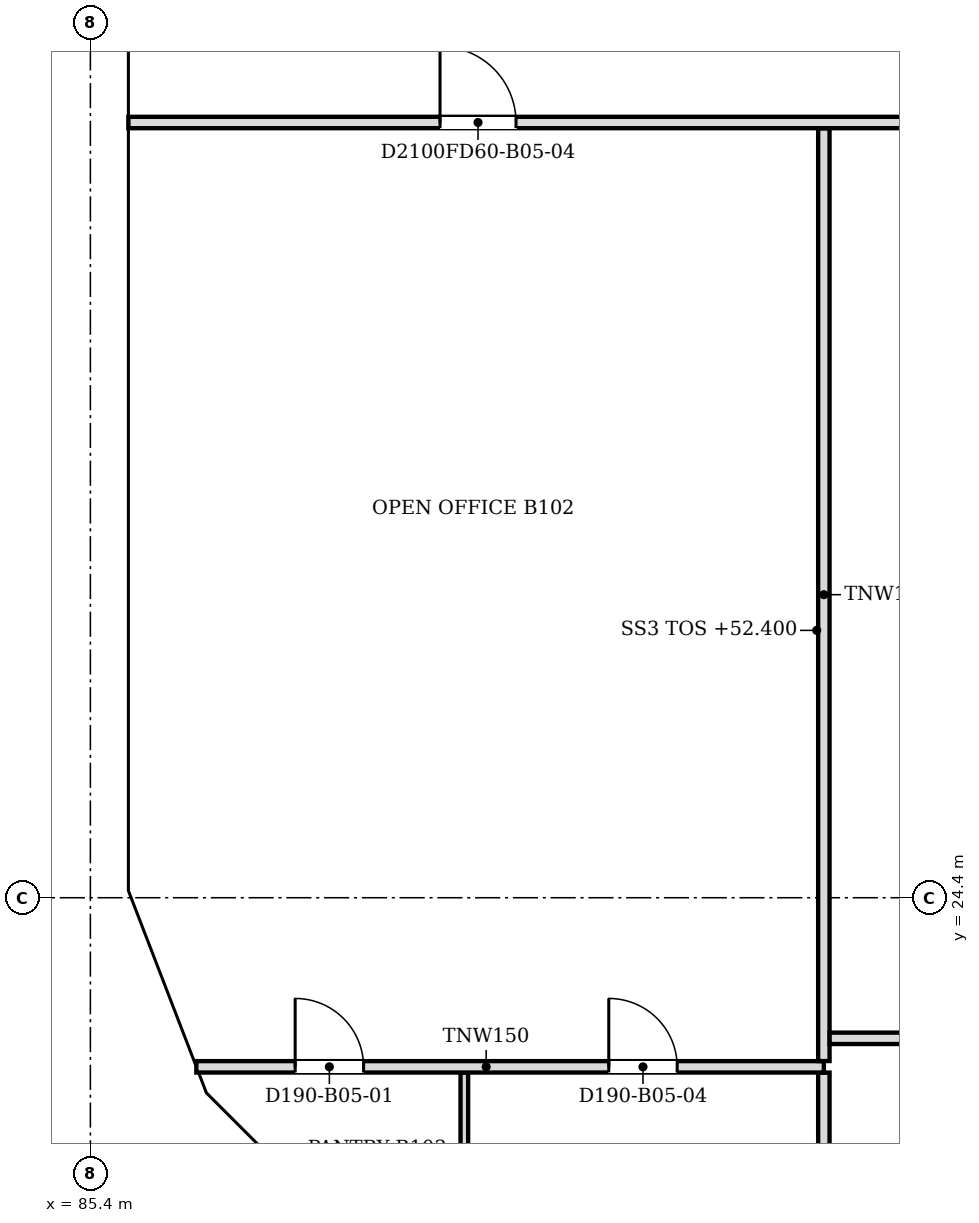
"""IFC4 building model, lengths in metres.
Left out: names, types, materials, properties, quantities, classifications, styles, units other than length and angle.
Written with IfcOpenShell. Run it as: python <this file> out.ifc"""

import sys

from ifc_helpers import new_model, si_unit, direction, frame, frame_2d, origin, place, context, subcontext, project, spatial, polyline, rectangle, outline, extrude, faceted_brep, source, transform, mapped, element, fill, save


model = new_model("IFC4")
c1 = context("Model", 3, precision=1e-05, world=origin(), true_north=direction((0.0, 1.0)))
c2 = subcontext(c1, "Body", "Model", "MODEL_VIEW")
j1 = project(units=[si_unit("LENGTHUNIT", "METRE"), si_unit("PLANEANGLEUNIT", "RADIAN")], contexts=[c1])
p1 = place(None, origin())
s1 = spatial("IfcSite", under=j1, at=p1, CompositionType="ELEMENT")
p2 = place(p1, origin())
s2 = spatial("IfcBuilding", under=s1, at=p2, CompositionType="ELEMENT")
p3 = place(p2, frame((0.0, 0.0, 52.4)))
s3 = spatial("IfcBuildingStorey", under=s2, at=p3, CompositionType="ELEMENT", Elevation=52.4)
m1 = source(origin(), c2, "Body", "Brep", [
    faceted_brep([(3.05, -0.25, 0.0), (6.1, -0.25, 3.8), (6.1, -0.25, 3.8), (3.05, -0.25, 7.6), (0.0, -0.25, 3.8), (0.0, 0.25, 3.8), (3.05, 0.25, 7.6), (6.1, 0.25, 3.8), (6.1, 0.25, 3.8), (3.05, 0.25, 0.0)], [[[0, 1, 2, 3, 4]], [[5, 6, 7, 8, 9]], [[9, 8, 1, 0]], [[7, 6, 3, 2]], [[6, 5, 4, 3]], [[5, 9, 0, 4]], [[1, 8, 7, 2]]]),
])
p4 = place(p3, frame((85.65, 39.65, -3.8), z_axis=(0.0, 0.0, 1.0), x_axis=(0.0, -1.0, 0.0)))
e1 = element("IfcWall", 1, at=p4, inside=s3, PredefinedType="SOLIDWALL", context=c2, shape_type="MappedRepresentation", body=[
    mapped(m1, transform((0.0, 0.0, 0.0), scale=1.0)),
])
m2 = source(origin(), c2, "Body", "SweptSolid", [
    extrude(outline(polyline([(3.05, 0.399), (5.78, 3.8), (3.05, 7.2), (0.321, 3.8), (3.05, 0.399)])), frame((0.0, 0.26, 0.0), z_axis=(0.0, -1.0, 0.0), x_axis=(1.0, 0.0, 0.0)), (0.0, 0.0, 1.0), 0.52),
])
p5 = place(p4, origin())
e2 = element("IfcOpeningElement", 2, at=p5, cuts=e1, PredefinedType="OPENING", context=c2, shape_type="MappedRepresentation", body=[
    mapped(m2, transform((0.0, 0.0, 0.0), scale=1.0)),
])
m3 = source(origin(), c2, "Body", "SweptSolid", [
    extrude(outline(polyline([(3.05, 0.0), (6.1, 3.8), (3.05, 7.6), (0.0, 3.8), (3.05, 0.0)])), frame((0.0, 0.25, 0.0), z_axis=(0.0, -1.0, 0.0), x_axis=(1.0, 0.0, 0.0)), (0.0, 0.0, 1.0), 0.5),
])
p6 = place(p3, frame((85.65, 33.55, -3.8), z_axis=(0.0, 0.0, 1.0), x_axis=(0.0, -1.0, 0.0)))
e3 = element("IfcWall", 3, at=p6, inside=s3, PredefinedType="SOLIDWALL", context=c2, shape_type="MappedRepresentation", body=[
    mapped(m3, transform((0.0, 0.0, 0.0), scale=1.0)),
])
p7 = place(p6, origin())
e4 = element("IfcOpeningElement", 4, at=p7, cuts=e3, PredefinedType="OPENING", context=c2, shape_type="MappedRepresentation", body=[
    mapped(m2, transform((0.0, 0.0, 0.0), scale=1.0)),
])
m4 = source(origin(), c2, "Body", "Brep", [
    faceted_brep([(3.003, -0.25, 0.0), (3.05, -0.25, 0.06), (3.05, -0.25, 7.54), (3.003, -0.25, 7.6), (0.0, -0.25, 3.8), (0.0, 0.25, 3.8), (2.957, 0.25, 7.541), (2.957, 0.25, 0.059), (3.003, 0.0, 0.0), (3.003, 0.0, 7.6)], [[[0, 1, 2, 3, 4]], [[5, 6, 7]], [[1, 0, 8]], [[9, 3, 2]], [[6, 5, 4, 3, 9]], [[5, 7, 8, 0, 4]], [[1, 8, 7, 6, 9, 2]]]),
])
p8 = place(p3, frame((85.65, 27.45, -3.8), z_axis=(0.0, 0.0, 1.0), x_axis=(0.0, -1.0, 0.0)))
e5 = element("IfcWall", 5, at=p8, inside=s3, PredefinedType="SOLIDWALL", context=c2, shape_type="MappedRepresentation", body=[
    mapped(m4, transform((0.0, 0.0, 0.0), scale=1.0)),
])
m5 = source(origin(), c2, "Body", "SweptSolid", [
    extrude(outline(polyline([(2.803, 6.944), (0.319, 3.8), (2.803, 0.656), (2.803, 6.944)])), frame((0.0, 0.26, 0.0), z_axis=(0.0, -1.0, 0.0), x_axis=(1.0, 0.0, 0.0)), (0.0, 0.0, 1.0), 0.52),
])
p9 = place(p8, origin())
e6 = element("IfcOpeningElement", 6, at=p9, cuts=e5, PredefinedType="OPENING", context=c2, shape_type="MappedRepresentation", body=[
    mapped(m5, transform((0.0, 0.0, 0.0), scale=1.0)),
])
m6 = source(origin(), c2, "Body", "Brep", [
    faceted_brep([(0.047, -0.25, 0.0), (2.997, -0.25, 3.8), (0.047, -0.25, 7.6), (0.0, -0.25, 7.541), (0.0, -0.25, 0.059), (0.093, 0.25, 7.54), (2.944, 0.25, 3.868), (2.944, 0.25, 3.732), (0.093, 0.25, 0.06), (2.997, 0.0, 3.8), (0.047, 0.0, 0.0), (0.047, 0.0, 7.6)], [[[0, 1, 2, 3, 4]], [[5, 6, 7, 8]], [[8, 7, 9, 1, 0, 10]], [[6, 5, 11, 2, 1, 9]], [[3, 2, 11]], [[10, 0, 4]], [[8, 10, 4, 3, 11, 5]], [[9, 7, 6]]]),
])
p10 = place(p3, frame((85.633, 24.49, -3.8), z_axis=(0.0, 0.0, 1.0), x_axis=(0.359901446078, -0.932990326376, 0.0)))
e7 = element("IfcWall", 7, at=p10, inside=s3, PredefinedType="SOLIDWALL", context=c2, shape_type="MappedRepresentation", body=[
    mapped(m6, transform((0.0, 0.0, 0.0), scale=1.0)),
])
m7 = source(origin(), c2, "Body", "SweptSolid", [
    extrude(outline(polyline([(0.247, 0.665), (2.681, 3.8), (0.247, 6.935), (0.247, 0.665)])), frame((0.0, 0.26, 0.0), z_axis=(0.0, -1.0, 0.0), x_axis=(1.0, 0.0, 0.0)), (0.0, 0.0, 1.0), 0.52),
])
p11 = place(p10, origin())
e8 = element("IfcOpeningElement", 8, at=p11, cuts=e7, PredefinedType="OPENING", context=c2, shape_type="MappedRepresentation", body=[
    mapped(m7, transform((0.0, 0.0, 0.0), scale=1.0)),
])
m8 = source(origin(), c2, "Body", "Brep", [
    faceted_brep([(2.944, -0.25, 0.0), (2.997, -0.25, 0.068), (2.997, -0.25, 7.532), (2.944, -0.25, 7.6), (0.0, -0.25, 3.8), (0.053, 0.25, 3.868), (2.891, 0.25, 7.532), (2.891, 0.25, 0.068), (0.053, 0.25, 3.731), (2.944, 0.0, 0.0), (2.944, 0.0, 7.6), (0.0, 0.0, 3.8)], [[[0, 1, 2, 3, 4]], [[5, 6, 7, 8]], [[1, 0, 9]], [[10, 3, 2]], [[6, 5, 11, 4, 3, 10]], [[8, 7, 9, 0, 4, 11]], [[8, 11, 5]], [[1, 9, 7, 6, 10, 2]]]),
])
p12 = place(p3, frame((86.712, 21.694, -3.8), z_axis=(0.0, 0.0, 1.0), x_axis=(0.707066050402, -0.707147509625, 0.0)))
e9 = element("IfcWall", 9, at=p12, inside=s3, PredefinedType="SOLIDWALL", context=c2, shape_type="MappedRepresentation", body=[
    mapped(m8, transform((0.0, 0.0, 0.0), scale=1.0)),
])
m9 = source(origin(), c2, "Body", "SweptSolid", [
    extrude(outline(polyline([(2.744, 6.934), (0.316, 3.8), (2.744, 0.666), (2.744, 6.934)])), frame((0.0, 0.26, 0.0), z_axis=(0.0, -1.0, 0.0), x_axis=(1.0, 0.0, 0.0)), (0.0, 0.0, 1.0), 0.52),
])
p13 = place(p12, origin())
e10 = element("IfcOpeningElement", 10, at=p13, cuts=e9, PredefinedType="OPENING", context=c2, shape_type="MappedRepresentation", body=[
    mapped(m9, transform((0.0, 0.0, 0.0), scale=1.0)),
])
p14 = place(p2, frame((0.0, 0.0, 56.2)))
s4 = spatial("IfcBuildingStorey", under=s2, at=p14, CompositionType="ELEMENT", Elevation=56.2)
m10 = source(origin(), c2, "Body", "SweptSolid", [
    extrude(outline(polyline([(3.05, 0.0), (6.1, 3.8), (3.05, 7.6), (0.0, 3.8), (3.05, 0.0)])), frame((0.0, 0.25, 0.0), z_axis=(0.0, -1.0, 0.0), x_axis=(1.0, 0.0, 0.0)), (0.0, 0.0, 1.0), 0.5),
])
p15 = place(p14, frame((85.65, 36.6, -3.8), z_axis=(0.0, 0.0, 1.0), x_axis=(0.0, -1.0, 0.0)))
e11 = element("IfcWall", 11, at=p15, inside=s4, PredefinedType="SOLIDWALL", context=c2, shape_type="MappedRepresentation", body=[
    mapped(m10, transform((0.0, 0.0, 0.0), scale=1.0)),
])
m11 = source(origin(), c2, "Body", "SweptSolid", [
    extrude(outline(polyline([(3.05, 0.399), (5.78, 3.8), (3.05, 7.201), (0.321, 3.8), (3.05, 0.399)])), frame((0.0, 0.26, 0.0), z_axis=(0.0, -1.0, 0.0), x_axis=(1.0, 0.0, 0.0)), (0.0, 0.0, 1.0), 0.52),
])
p16 = place(p15, origin())
e12 = element("IfcOpeningElement", 12, at=p16, cuts=e11, PredefinedType="OPENING", context=c2, shape_type="MappedRepresentation", body=[
    mapped(m11, transform((0.0, 0.0, 0.0), scale=1.0)),
])
m12 = source(origin(), c2, "Body", "Brep", [
    faceted_brep([(3.05, -0.25, 0.0), (6.053, -0.25, 3.8), (3.05, -0.25, 7.6), (0.0, -0.25, 3.8), (0.0, 0.25, 3.8), (3.05, 0.25, 7.6), (6.007, 0.25, 3.859), (6.007, 0.25, 3.741), (3.05, 0.25, 0.0), (6.053, 0.0, 3.8)], [[[0, 1, 2, 3]], [[4, 5, 6, 7, 8]], [[8, 7, 9, 1, 0]], [[6, 5, 2, 1, 9]], [[5, 4, 3, 2]], [[4, 8, 0, 3]], [[9, 7, 6]]]),
])
p17 = place(p14, frame((85.65, 30.5, -3.8), z_axis=(0.0, 0.0, 1.0), x_axis=(0.0, -1.0, 0.0)))
e13 = element("IfcWall", 13, at=p17, inside=s4, PredefinedType="SOLIDWALL", context=c2, shape_type="MappedRepresentation", body=[
    mapped(m12, transform((0.0, 0.0, 0.0), scale=1.0)),
])
m13 = source(origin(), c2, "Body", "SweptSolid", [
    extrude(outline(polyline([(3.049, 0.401), (5.735, 3.8), (3.049, 7.199), (0.321, 3.8), (3.049, 0.401)])), frame((0.0, 0.26, 0.0), z_axis=(0.0, -1.0, 0.0), x_axis=(1.0, 0.0, 0.0)), (0.0, 0.0, 1.0), 0.52),
])
p18 = place(p17, origin())
e14 = element("IfcOpeningElement", 14, at=p18, cuts=e13, PredefinedType="OPENING", context=c2, shape_type="MappedRepresentation", body=[
    mapped(m13, transform((0.0, 0.0, 0.0), scale=1.0)),
])
m14 = source(origin(), c2, "Body", "Brep", [
    faceted_brep([(2.95, -0.25, 0.0), (3.003, -0.25, 0.068), (3.003, -0.25, 7.532), (2.95, -0.25, 7.6), (0.0, -0.25, 3.8), (0.047, 0.25, 3.86), (2.898, 0.25, 7.532), (2.898, 0.25, 0.068), (0.047, 0.25, 3.74), (2.95, 0.0, 0.0), (2.95, 0.0, 7.6), (0.0, 0.0, 3.8)], [[[0, 1, 2, 3, 4]], [[5, 6, 7, 8]], [[1, 0, 9]], [[10, 3, 2]], [[6, 5, 11, 4, 3, 10]], [[8, 7, 9, 0, 4, 11]], [[8, 11, 5]], [[1, 9, 7, 6, 10, 2]]]),
])
p19 = place(p14, frame((85.65, 24.447, -3.8), z_axis=(0.0, 0.0, 1.0), x_axis=(0.35992665181, -0.932980602862, 0.0)))
e15 = element("IfcWall", 15, at=p19, inside=s4, PredefinedType="SOLIDWALL", context=c2, shape_type="MappedRepresentation", body=[
    mapped(m14, transform((0.0, 0.0, 0.0), scale=1.0)),
])
m15 = source(origin(), c2, "Body", "SweptSolid", [
    extrude(outline(polyline([(2.75, 6.935), (0.316, 3.8), (2.75, 0.665), (2.75, 6.935)])), frame((0.0, 0.26, 0.0), z_axis=(0.0, -1.0, 0.0), x_axis=(1.0, 0.0, 0.0)), (0.0, 0.0, 1.0), 0.52),
])
p20 = place(p19, origin())
e16 = element("IfcOpeningElement", 16, at=p20, cuts=e15, PredefinedType="OPENING", context=c2, shape_type="MappedRepresentation", body=[
    mapped(m15, transform((0.0, 0.0, 0.0), scale=1.0)),
])
m16 = source(origin(), c2, "Body", "Brep", [
    faceted_brep([(0.053, -0.25, 0.0), (2.997, -0.25, 3.8), (0.053, -0.25, 7.6), (0.0, -0.25, 7.532), (0.0, -0.25, 0.068), (0.106, 0.25, 7.532), (2.944, 0.25, 3.868), (2.944, 0.25, 3.732), (0.106, 0.25, 0.068), (2.997, 0.0, 3.8), (0.053, 0.0, 0.0), (0.053, 0.0, 7.6)], [[[0, 1, 2, 3, 4]], [[5, 6, 7, 8]], [[8, 7, 9, 1, 0, 10]], [[6, 5, 11, 2, 1, 9]], [[3, 2, 11]], [[10, 0, 4]], [[8, 10, 4, 3, 11, 5]], [[9, 7, 6]]]),
])
p21 = place(p14, frame((86.675, 21.731, -3.8), z_axis=(0.0, 0.0, 1.0), x_axis=(0.707106781187, -0.707106781187, 0.0)))
e17 = element("IfcWall", 17, at=p21, inside=s4, PredefinedType="SOLIDWALL", context=c2, shape_type="MappedRepresentation", body=[
    mapped(m16, transform((0.0, 0.0, 0.0), scale=1.0)),
])
m17 = source(origin(), c2, "Body", "SweptSolid", [
    extrude(outline(polyline([(0.253, 0.667), (2.681, 3.8), (0.253, 6.934), (0.253, 0.667)])), frame((0.0, 0.26, 0.0), z_axis=(0.0, -1.0, 0.0), x_axis=(1.0, 0.0, 0.0)), (0.0, 0.0, 1.0), 0.52),
])
p22 = place(p21, origin())
e18 = element("IfcOpeningElement", 18, at=p22, cuts=e17, PredefinedType="OPENING", context=c2, shape_type="MappedRepresentation", body=[
    mapped(m17, transform((0.0, 0.0, 0.0), scale=1.0)),
])
p23 = place(p3, frame((95.05, 18.8, 0.0), z_axis=(0.0, 0.0, 1.0), x_axis=(0.0, 1.0, 0.0)))
e19 = element("IfcWall", 19, at=p23, inside=s3, PredefinedType="PARTITIONING", context=c2, shape_type="SweptSolid", body=[
    extrude(rectangle(XDim=3.299, YDim=0.15, at=frame_2d((1.649, 0.0))), origin(), (0.0, 0.0, 1.0), 3.067),
])
p24 = place(p3, frame((90.32, 19.291, 0.0), z_axis=(0.0, 0.0, 1.0), x_axis=(0.0, 1.0, 0.0)))
e20 = element("IfcWall", 20, at=p24, inside=s3, PredefinedType="PARTITIONING", context=c2, shape_type="SweptSolid", body=[
    extrude(rectangle(XDim=2.808, YDim=0.1, at=frame_2d((1.404, 0.0))), origin(), (0.0, 0.0, 1.0), 3.067),
])
p25 = place(p3, frame((95.05, 22.175, 0.0), z_axis=(0.0, 0.0, 1.0), x_axis=(-1.0, 0.0, 0.0)))
e21 = element("IfcWall", 21, at=p25, inside=s3, PredefinedType="PARTITIONING", context=c2, shape_type="SweptSolid", body=[
    extrude(rectangle(XDim=8.256, YDim=0.15, at=frame_2d((4.128, 0.0))), origin(), (0.0, 0.0, 1.0), 3.067),
])
m18 = source(origin(), c2, "Body", "SweptSolid", [
    extrude(rectangle(XDim=0.9, YDim=2.1, at=frame_2d((0.45, 1.05))), frame((0.0, 0.085, 0.0), z_axis=(0.0, -1.0, 0.0), x_axis=(1.0, 0.0, 0.0)), (0.0, 0.0, 1.0), 0.17),
])
p26 = place(p25, frame((6.056, 0.0, 0.0)))
e22 = element("IfcOpeningElement", 22, at=p26, cuts=e21, PredefinedType="OPENING", context=c2, shape_type="MappedRepresentation", body=[
    mapped(m18, transform((0.0, 0.0, 0.0), scale=1.0)),
])
p27 = place(p25, frame((1.93, 0.0, 0.0)))
e23 = element("IfcOpeningElement", 23, at=p27, cuts=e21, PredefinedType="OPENING", context=c2, shape_type="MappedRepresentation", body=[
    mapped(m18, transform((0.0, 0.0, 0.0), scale=1.0)),
])
p28 = place(p3, frame((95.05, 22.251, 0.0), z_axis=(0.0, 0.0, 1.0), x_axis=(0.0, 1.0, 0.0)))
e24 = element("IfcWall", 24, at=p28, inside=s3, PredefinedType="PARTITIONING", context=c2, shape_type="SweptSolid", body=[
    extrude(rectangle(XDim=12.273, YDim=0.15, at=frame_2d((6.136, 0.0))), origin(), (0.0, 0.0, 1.0), 3.067),
])
p29 = place(p3, frame((107.25, 22.55, 0.0), z_axis=(0.0, 0.0, 1.0), x_axis=(-1.0, 0.0, 0.0)))
e25 = element("IfcWall", 25, at=p29, inside=s3, PredefinedType="PARTITIONING", context=c2, shape_type="SweptSolid", body=[
    extrude(rectangle(XDim=12.124, YDim=0.15, at=frame_2d((6.062, 0.0))), origin(), (0.0, 0.0, 1.0), 3.067),
])
p30 = place(p29, frame((8.624, 0.0, 0.0)))
e26 = element("IfcOpeningElement", 26, at=p30, cuts=e25, PredefinedType="OPENING", context=c2, shape_type="MappedRepresentation", body=[
    mapped(m18, transform((0.0, 0.0, 0.0), scale=1.0)),
])
p31 = place(p29, frame((2.706, 0.0, 0.0)))
e27 = element("IfcOpeningElement", 27, at=p31, cuts=e25, PredefinedType="OPENING", context=c2, shape_type="MappedRepresentation", body=[
    mapped(m18, transform((0.0, 0.0, 0.0), scale=1.0)),
])
p32 = place(p3, frame((133.7, 34.6, 0.0), z_axis=(0.0, 0.0, 1.0), x_axis=(-1.0, 0.0, 0.0)))
e28 = element("IfcWall", 28, at=p32, inside=s3, PredefinedType="PARTITIONING", context=c2, shape_type="SweptSolid", body=[
    extrude(rectangle(XDim=47.8, YDim=0.15, at=frame_2d((23.9, 0.0))), origin(), (0.0, 0.0, 1.0), 3.067),
])
m19 = source(origin(), c2, "Body", "SweptSolid", [
    extrude(rectangle(XDim=1.0, YDim=2.1, at=frame_2d((0.5, 1.05))), frame((0.0, 0.085, 0.0), z_axis=(0.0, -1.0, 0.0), x_axis=(1.0, 0.0, 0.0)), (0.0, 0.0, 1.0), 0.17),
])
p33 = place(p32, frame((3.549, 0.0, 0.0)))
e29 = element("IfcOpeningElement", 29, at=p33, cuts=e28, PredefinedType="OPENING", context=c2, shape_type="MappedRepresentation", body=[
    mapped(m19, transform((0.0, 0.0, 0.0), scale=1.0)),
])
p34 = place(p32, frame((42.7, 0.0, 0.0)))
e30 = element("IfcOpeningElement", 30, at=p34, cuts=e28, PredefinedType="OPENING", context=c2, shape_type="MappedRepresentation", body=[
    mapped(m19, transform((0.0, 0.0, 0.0), scale=1.0)),
])
p35 = place(p32, frame((12.299, 0.0, 0.0)))
e31 = element("IfcOpeningElement", 31, at=p35, cuts=e28, PredefinedType="OPENING", context=c2, shape_type="MappedRepresentation", body=[
    mapped(m18, transform((0.0, 0.0, 0.0), scale=1.0)),
])
p36 = place(p32, frame((21.349, 0.0, 0.0)))
e32 = element("IfcOpeningElement", 32, at=p36, cuts=e28, PredefinedType="OPENING", context=c2, shape_type="MappedRepresentation", body=[
    mapped(m19, transform((0.0, 0.0, 0.0), scale=1.0)),
])
p37 = place(p32, frame((32.05, 0.0, 0.0)))
e33 = element("IfcOpeningElement", 33, at=p37, cuts=e28, PredefinedType="OPENING", context=c2, shape_type="MappedRepresentation", body=[
    mapped(m19, transform((0.0, 0.0, 0.0), scale=1.0)),
])
m20 = source(origin(), c2, "Body", "SweptSolid", [
    extrude(rectangle(XDim=0.9, YDim=2.1, at=frame_2d((0.45, 1.05))), frame((0.0, 0.025, 0.0), z_axis=(0.0, -1.0, 0.0), x_axis=(1.0, 0.0, 0.0)), (0.0, 0.0, 1.0), 0.05),
])
p38 = place(p26, origin())
e34 = element("IfcDoor", 34, at=p38, inside=s3, OperationType="SINGLE_SWING_RIGHT", PredefinedType="DOOR", context=c2, shape_type="MappedRepresentation", body=[
    mapped(m20, transform((0.0, 0.0, 0.0), scale=1.0)),
])
fill(e22, e34)
p39 = place(p27, origin())
e35 = element("IfcDoor", 35, at=p39, inside=s3, OperationType="SINGLE_SWING_RIGHT", PredefinedType="DOOR", context=c2, shape_type="MappedRepresentation", body=[
    mapped(m20, transform((0.0, 0.0, 0.0), scale=1.0)),
])
fill(e23, e35)
m21 = source(origin(), c2, "Body", "SweptSolid", [
    extrude(rectangle(XDim=1.0, YDim=2.1, at=frame_2d((0.5, 1.05))), frame((0.0, 0.025, 0.0), z_axis=(0.0, -1.0, 0.0), x_axis=(1.0, 0.0, 0.0)), (0.0, 0.0, 1.0), 0.05),
])
p40 = place(p34, origin())
e36 = element("IfcDoor", 36, at=p40, inside=s3, OperationType="SINGLE_SWING_RIGHT", PredefinedType="DOOR", context=c2, shape_type="MappedRepresentation", body=[
    mapped(m21, transform((0.0, 0.0, 0.0), scale=1.0)),
])
fill(e30, e36)
save(model, sys.argv[1])
